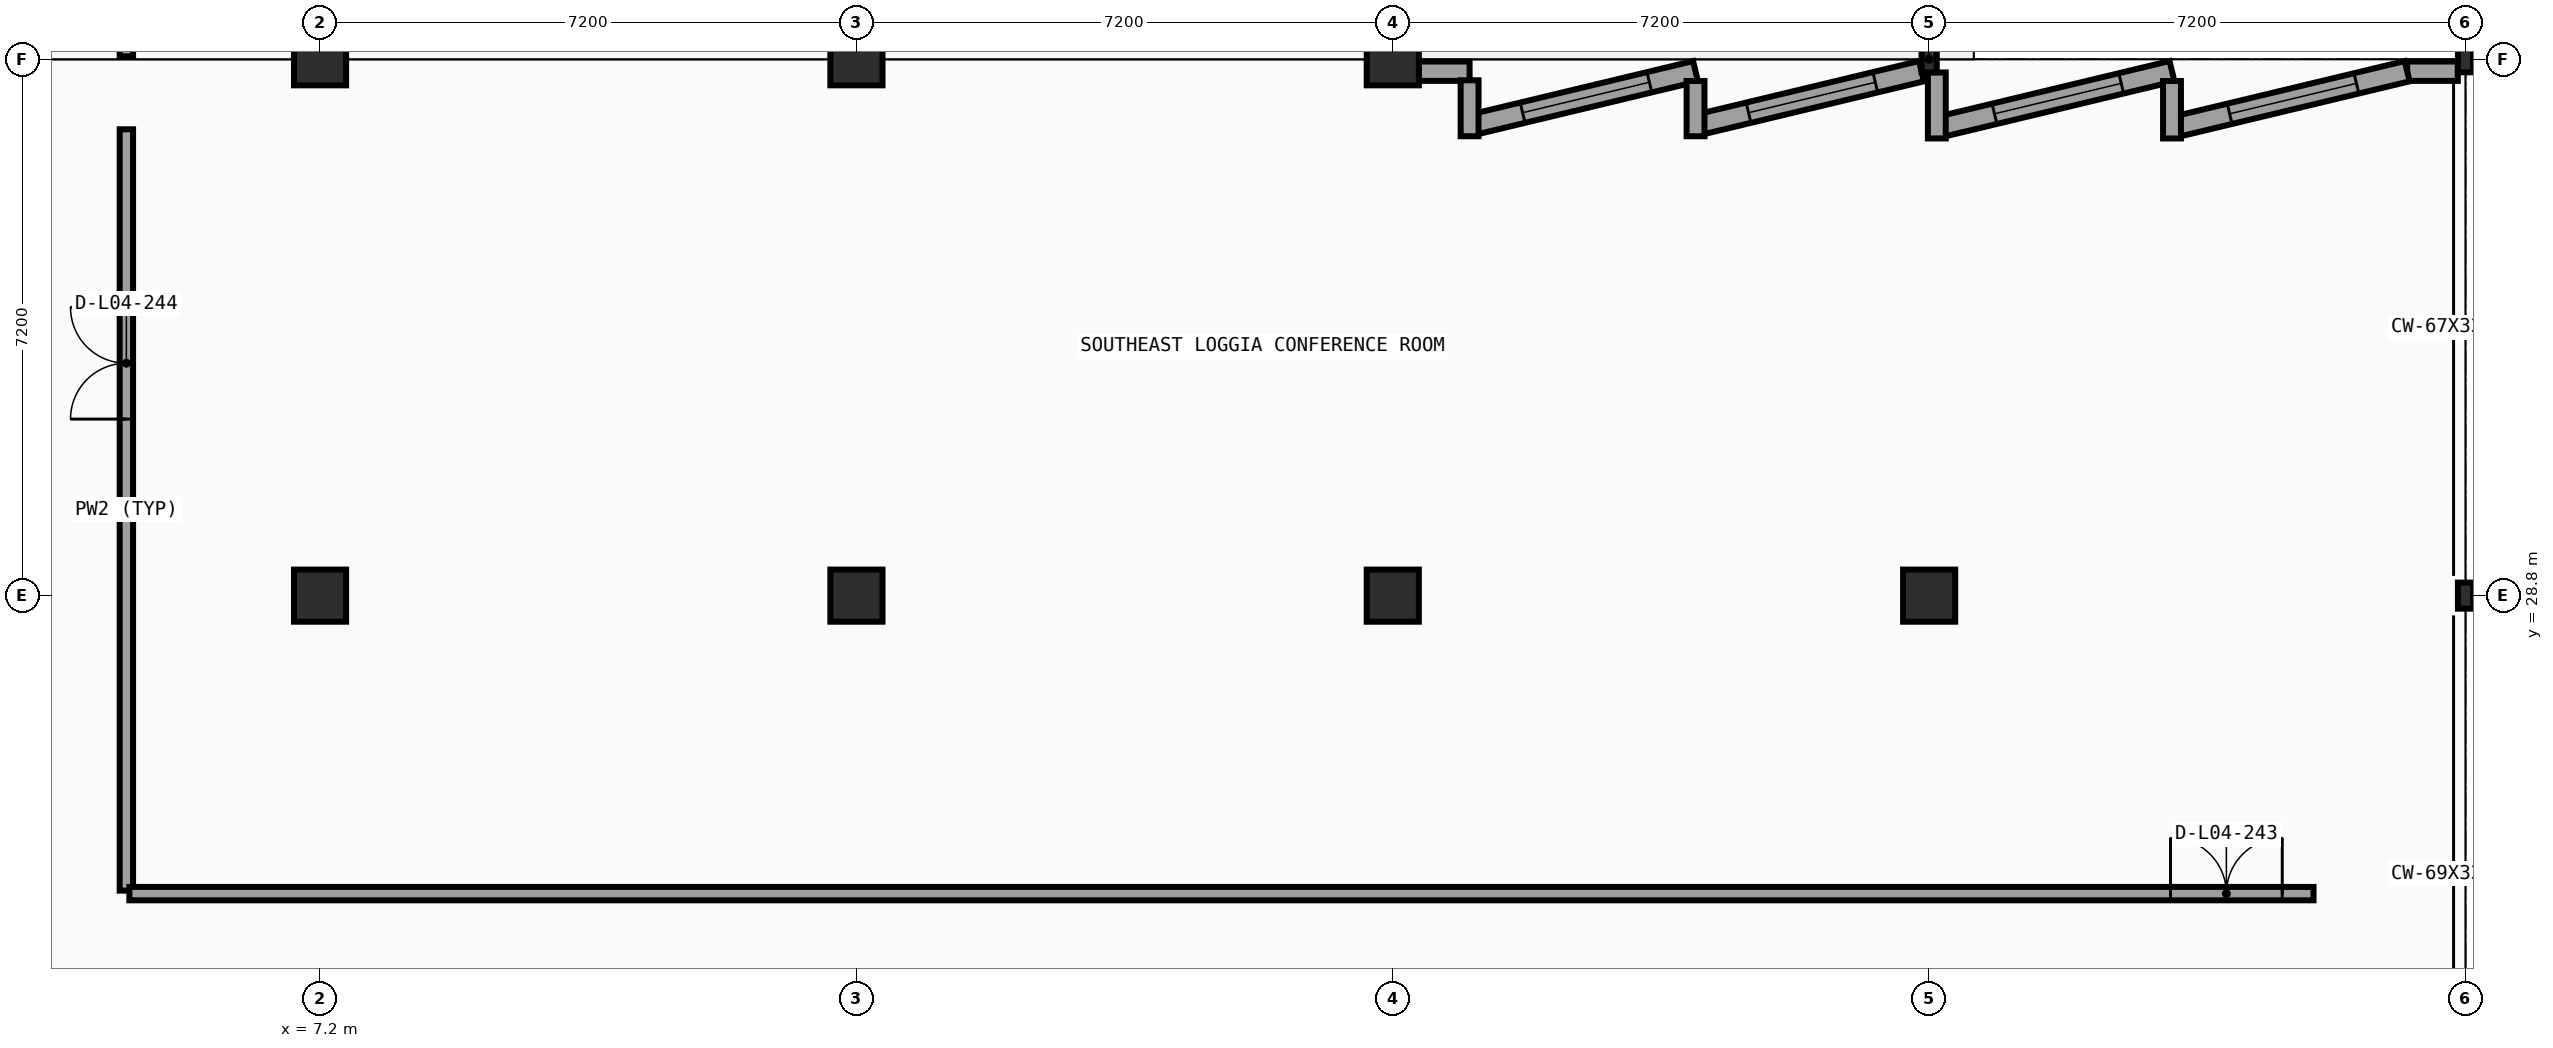
"""IFC4 building model, lengths in metres.
Left out: names, types, materials, properties, quantities, classifications, styles, units other than length and angle.
Written with IfcOpenShell. Run it as: python <this file> out.ifc"""

import sys

from ifc_helpers import new_model, si_unit, direction, frame, frame_2d, origin, origin_2d, place, context, subcontext, project, spatial, rectangle, i_section, extrude, element, fill, save


model = new_model("IFC4")
c1 = context("Model", 3, precision=1e-05, world=origin(), true_north=direction((0.0, 1.0)))
c2 = subcontext(c1, "Body", "Model", "MODEL_VIEW")
j1 = project(units=[si_unit("LENGTHUNIT", "METRE"), si_unit("PLANEANGLEUNIT", "RADIAN")], contexts=[c1])
p1 = place(None, origin())
s1 = spatial("IfcSite", under=j1, at=p1, CompositionType="ELEMENT")
p2 = place(p1, origin())
s2 = spatial("IfcBuilding", under=s1, at=p2, CompositionType="ELEMENT")
p3 = place(p2, frame((0.0, 0.0, 18.9)))
s3 = spatial("IfcBuildingStorey", under=s2, at=p3, CompositionType="ELEMENT", Elevation=18.9)
for number, where, z_axis, x_axis in (
    (1, (7.2, 28.8, 0.0), (0.0, 0.0, 1.0), (1.0, 0.0, 0.0)),
    (2, (7.2, 36.0, 0.0), (0.0, 0.0, 1.0), (1.0, 0.0, 0.0)),
    (3, (14.4, 28.8, 0.0), (0.0, 0.0, 1.0), (1.0, 0.0, 0.0)),
    (4, (14.4, 36.0, 0.0), (0.0, 0.0, 1.0), (1.0, 0.0, 0.0)),
    (5, (21.6, 28.8, 0.0), (0.0, 0.0, 1.0), (1.0, 0.0, 0.0)),
    (6, (21.6, 36.0, 0.0), (0.0, 0.0, 1.0), (1.0, 0.0, 0.0)),
    (7, (28.8, 28.8, 0.0), (0.0, 0.0, 1.0), (1.0, 0.0, 0.0)),
):
    element("IfcColumn", number, at=place(p3, frame(where, z_axis=z_axis, x_axis=x_axis)), inside=s3, PredefinedType="COLUMN", context=c2, shape_type="SweptSolid", body=[
        extrude(rectangle(XDim=0.7, YDim=0.7, at=origin_2d()), origin(), (0.0, 0.0, 1.0), 4.05),
    ])
for number, where, z_axis, x_axis in (
    (8, (28.8, 36.0, 0.0), (0.0, 0.0, 1.0), (1.0, 0.0, 0.0)),
    (9, (36.0, 28.8, 0.0), (0.0, 0.0, 1.0), (1.0, 0.0, 0.0)),
    (10, (36.0, 36.0, 0.0), (0.0, 0.0, 1.0), (1.0, 0.0, 0.0)),
):
    element("IfcColumn", number, at=place(p3, frame(where, z_axis=z_axis, x_axis=x_axis)), inside=s3, PredefinedType="COLUMN", context=c2, shape_type="SweptSolid", body=[
        extrude(i_section(OverallWidth=0.204, OverallDepth=0.35, WebThickness=0.009, FlangeThickness=0.015, FilletRadius=0.015, at=origin_2d()), origin(), (0.0, 0.0, 1.0), 4.05),
    ])
p4 = place(p3, frame((21.951, 35.84, 0.0), z_axis=(0.0, 0.0, 1.0), x_axis=(1.0, 0.0, 0.0)))
e11 = element("IfcWall", 11, at=p4, inside=s3, PredefinedType="SOLIDWALL", context=c2, shape_type="SweptSolid", body=[
    extrude(rectangle(XDim=0.68, YDim=0.26, at=frame_2d((0.34, 0.0))), origin(), (0.0, 0.0, 1.0), 3.216),
])
p5 = place(p3, frame((22.723, 35.134, 0.0), z_axis=(0.0, 0.0, 1.0), x_axis=(0.972365314325, 0.233464548695, 0.0)))
e12 = element("IfcWall", 12, at=p5, inside=s3, PredefinedType="SOLIDWALL", context=c2, shape_type="SweptSolid", body=[
    extrude(rectangle(XDim=3.024, YDim=0.28, at=frame_2d((1.512, 0.0))), origin(), (0.0, 0.0, 1.0), 3.216),
])
p6 = place(p5, frame((0.637, 0.0, 0.8)))
e13 = element("IfcOpeningElement", 13, at=p6, cuts=e12, PredefinedType="OPENING", context=c2, shape_type="SweptSolid", body=[
    extrude(rectangle(XDim=1.75, YDim=2.05, at=frame_2d((0.875, 1.025))), frame((0.0, 0.15, 0.0), z_axis=(0.0, -1.0, 0.0), x_axis=(1.0, 0.0, 0.0)), (0.0, 0.0, 1.0), 0.3),
])
p7 = place(p3, frame((22.631, 34.967, 0.0), z_axis=(0.0, 0.0, 1.0), x_axis=(0.0, 1.0, 0.0)))
e14 = element("IfcWall", 14, at=p7, inside=s3, PredefinedType="SOLIDWALL", context=c2, shape_type="SweptSolid", body=[
    extrude(rectangle(XDim=0.751, YDim=0.24, at=frame_2d((0.375, 0.0))), origin(), (0.0, 0.0, 1.0), 3.8),
])
p8 = place(p3, frame((25.756, 35.134, 0.0), z_axis=(0.0, 0.0, 1.0), x_axis=(0.972365314325, 0.233464548695, 0.0)))
e15 = element("IfcWall", 15, at=p8, inside=s3, PredefinedType="SOLIDWALL", context=c2, shape_type="SweptSolid", body=[
    extrude(rectangle(XDim=3.024, YDim=0.28, at=frame_2d((1.512, 0.0))), origin(), (0.0, 0.0, 1.0), 3.216),
])
p9 = place(p8, frame((0.637, 0.0, 0.8)))
e16 = element("IfcOpeningElement", 16, at=p9, cuts=e15, PredefinedType="OPENING", context=c2, shape_type="SweptSolid", body=[
    extrude(rectangle(XDim=1.75, YDim=2.05, at=frame_2d((0.875, 1.025))), frame((0.0, 0.15, 0.0), z_axis=(0.0, -1.0, 0.0), x_axis=(1.0, 0.0, 0.0)), (0.0, 0.0, 1.0), 0.3),
])
p10 = place(p3, frame((25.664, 34.967, 0.0), z_axis=(0.0, 0.0, 1.0), x_axis=(0.0, 1.0, 0.0)))
e17 = element("IfcWall", 17, at=p10, inside=s3, PredefinedType="SOLIDWALL", context=c2, shape_type="SweptSolid", body=[
    extrude(rectangle(XDim=0.741, YDim=0.24, at=frame_2d((0.371, 0.0))), origin(), (0.0, 0.0, 1.0), 3.8),
])
p11 = place(p3, frame((35.217, 35.84, 0.0), z_axis=(0.0, 0.0, 1.0), x_axis=(1.0, 0.0, 0.0)))
e18 = element("IfcWall", 18, at=p11, inside=s3, PredefinedType="SOLIDWALL", context=c2, shape_type="SweptSolid", body=[
    extrude(rectangle(XDim=0.68, YDim=0.26, at=frame_2d((0.34, 0.0))), origin(), (0.0, 0.0, 1.0), 3.216),
])
p12 = place(p3, frame((28.995, 35.104, 0.0), z_axis=(0.0, 0.0, 1.0), x_axis=(0.972364797516, 0.233466701164, 0.0)))
e19 = element("IfcWall", 19, at=p12, inside=s3, PredefinedType="SOLIDWALL", context=c2, shape_type="SweptSolid", body=[
    extrude(rectangle(XDim=3.152, YDim=0.28, at=frame_2d((1.576, 0.0))), origin(), (0.0, 0.0, 1.0), 3.206),
])
p13 = place(p12, frame((0.701, 0.0, 0.8)))
e20 = element("IfcOpeningElement", 20, at=p13, cuts=e19, PredefinedType="OPENING", context=c2, shape_type="SweptSolid", body=[
    extrude(rectangle(XDim=1.75, YDim=2.05, at=frame_2d((0.875, 1.025))), frame((0.0, 0.15, 0.0), z_axis=(0.0, -1.0, 0.0), x_axis=(1.0, 0.0, 0.0)), (0.0, 0.0, 1.0), 0.3),
])
p14 = place(p3, frame((28.903, 34.937, 0.0), z_axis=(0.0, 0.0, 1.0), x_axis=(0.0, 1.0, 0.0)))
e21 = element("IfcWall", 21, at=p14, inside=s3, PredefinedType="SOLIDWALL", context=c2, shape_type="SweptSolid", body=[
    extrude(rectangle(XDim=0.886, YDim=0.24, at=frame_2d((0.443, 0.0))), origin(), (0.0, 0.0, 1.0), 3.206),
])
p15 = place(p3, frame((32.152, 35.104, 0.0), z_axis=(0.0, 0.0, 1.0), x_axis=(0.972364797516, 0.233466701164, 0.0)))
e22 = element("IfcWall", 22, at=p15, inside=s3, PredefinedType="SOLIDWALL", context=c2, shape_type="SweptSolid", body=[
    extrude(rectangle(XDim=3.152, YDim=0.28, at=frame_2d((1.576, 0.0))), origin(), (0.0, 0.0, 1.0), 3.216),
])
p16 = place(p15, frame((0.701, 0.0, 0.8)))
e23 = element("IfcOpeningElement", 23, at=p16, cuts=e22, PredefinedType="OPENING", context=c2, shape_type="SweptSolid", body=[
    extrude(rectangle(XDim=1.75, YDim=2.05, at=frame_2d((0.875, 1.025))), frame((0.0, 0.15, 0.0), z_axis=(0.0, -1.0, 0.0), x_axis=(1.0, 0.0, 0.0)), (0.0, 0.0, 1.0), 0.3),
])
p17 = place(p3, frame((32.06, 34.937, 0.0), z_axis=(0.0, 0.0, 1.0), x_axis=(0.0, 1.0, 0.0)))
e24 = element("IfcWall", 24, at=p17, inside=s3, PredefinedType="SOLIDWALL", context=c2, shape_type="SweptSolid", body=[
    extrude(rectangle(XDim=0.771, YDim=0.24, at=frame_2d((0.385, 0.0))), origin(), (0.0, 0.0, 1.0), 3.8),
])
p18 = place(p3, frame((4.6, 24.84, 0.0), z_axis=(0.0, 0.0, 1.0), x_axis=(0.0, 1.0, 0.0)))
e25 = element("IfcWall", 25, at=p18, inside=s3, PredefinedType="PARTITIONING", context=c2, shape_type="SweptSolid", body=[
    extrude(rectangle(XDim=10.22, YDim=0.18, at=frame_2d((5.11, 0.0))), origin(), (0.0, 0.0, 1.0), 3.208),
])
p19 = place(p18, frame((6.33, 0.0, 0.0)))
e26 = element("IfcOpeningElement", 26, at=p19, cuts=e25, PredefinedType="OPENING", context=c2, shape_type="SweptSolid", body=[
    extrude(rectangle(XDim=1.5, YDim=2.1, at=frame_2d((0.75, 1.05))), frame((0.0, 0.1, 0.0), z_axis=(0.0, -1.0, 0.0), x_axis=(1.0, 0.0, 0.0)), (0.0, 0.0, 1.0), 0.2),
])
p20 = place(p3, frame((4.6, 36.04, 0.0), z_axis=(0.0, 0.0, 1.0), x_axis=(0.0, 1.0, 0.0)))
e27 = element("IfcWall", 27, at=p20, inside=s3, PredefinedType="PARTITIONING", context=c2, shape_type="SweptSolid", body=[
    extrude(rectangle(XDim=14.32, YDim=0.18, at=frame_2d((7.16, 0.0))), origin(), (0.0, 0.0, 1.0), 3.208),
])
p21 = place(p20, frame((3.54, 0.0, 0.0)))
e28 = element("IfcOpeningElement", 28, at=p21, cuts=e27, PredefinedType="OPENING", context=c2, shape_type="SweptSolid", body=[
    extrude(rectangle(XDim=1.0, YDim=2.1, at=frame_2d((0.5, 1.05))), frame((0.0, 0.1, 0.0), z_axis=(0.0, -1.0, 0.0), x_axis=(1.0, 0.0, 0.0)), (0.0, 0.0, 1.0), 0.2),
])
p22 = place(p3, frame((4.64, 24.8, 0.0), z_axis=(0.0, 0.0, 1.0), x_axis=(1.0, 0.0, 0.0)))
e29 = element("IfcWall", 29, at=p22, inside=s3, PredefinedType="PARTITIONING", context=c2, shape_type="SweptSolid", body=[
    extrude(rectangle(XDim=29.32, YDim=0.18, at=frame_2d((14.66, 0.0))), origin(), (0.0, 0.0, 1.0), 3.206),
])
p23 = place(p22, frame((27.4, 0.0, 0.0)))
e30 = element("IfcOpeningElement", 30, at=p23, cuts=e29, PredefinedType="OPENING", context=c2, shape_type="SweptSolid", body=[
    extrude(rectangle(XDim=1.5, YDim=2.1, at=frame_2d((0.75, 1.05))), frame((0.0, 0.1, 0.0), z_axis=(0.0, -1.0, 0.0), x_axis=(1.0, 0.0, 0.0)), (0.0, 0.0, 1.0), 0.2),
])
p24 = place(p6, origin())
e31 = element("IfcWindow", 31, at=p24, inside=s3, PartitioningType="SINGLE_PANEL", PredefinedType="WINDOW", context=c2, shape_type="SweptSolid", body=[
    extrude(rectangle(XDim=1.75, YDim=2.05, at=frame_2d((0.875, 1.025))), frame((0.0, 0.03, 0.0), z_axis=(0.0, -1.0, 0.0), x_axis=(1.0, 0.0, 0.0)), (0.0, 0.0, 1.0), 0.06),
])
fill(e13, e31)
p25 = place(p9, origin())
e32 = element("IfcWindow", 32, at=p25, inside=s3, PartitioningType="SINGLE_PANEL", PredefinedType="WINDOW", context=c2, shape_type="SweptSolid", body=[
    extrude(rectangle(XDim=1.75, YDim=2.05, at=frame_2d((0.875, 1.025))), frame((0.0, 0.03, 0.0), z_axis=(0.0, -1.0, 0.0), x_axis=(1.0, 0.0, 0.0)), (0.0, 0.0, 1.0), 0.06),
])
fill(e16, e32)
p26 = place(p13, origin())
e33 = element("IfcWindow", 33, at=p26, inside=s3, PartitioningType="SINGLE_PANEL", PredefinedType="WINDOW", context=c2, shape_type="SweptSolid", body=[
    extrude(rectangle(XDim=1.75, YDim=2.05, at=frame_2d((0.875, 1.025))), frame((0.0, 0.03, 0.0), z_axis=(0.0, -1.0, 0.0), x_axis=(1.0, 0.0, 0.0)), (0.0, 0.0, 1.0), 0.06),
])
fill(e20, e33)
p27 = place(p16, origin())
e34 = element("IfcWindow", 34, at=p27, inside=s3, PartitioningType="SINGLE_PANEL", PredefinedType="WINDOW", context=c2, shape_type="SweptSolid", body=[
    extrude(rectangle(XDim=1.75, YDim=2.05, at=frame_2d((0.875, 1.025))), frame((0.0, 0.03, 0.0), z_axis=(0.0, -1.0, 0.0), x_axis=(1.0, 0.0, 0.0)), (0.0, 0.0, 1.0), 0.06),
])
fill(e23, e34)
p28 = place(p23, origin())
e35 = element("IfcDoor", 35, at=p28, inside=s3, OperationType="DOUBLE_DOOR_SINGLE_SWING", PredefinedType="DOOR", context=c2, shape_type="SweptSolid", body=[
    extrude(rectangle(XDim=1.5, YDim=2.1, at=frame_2d((0.75, 1.05))), frame((0.0, 0.025, 0.0), z_axis=(0.0, -1.0, 0.0), x_axis=(1.0, 0.0, 0.0)), (0.0, 0.0, 1.0), 0.05),
])
fill(e30, e35)
p29 = place(p19, origin())
e36 = element("IfcDoor", 36, at=p29, inside=s3, OperationType="DOUBLE_DOOR_SINGLE_SWING", PredefinedType="DOOR", context=c2, shape_type="SweptSolid", body=[
    extrude(rectangle(XDim=1.5, YDim=2.1, at=frame_2d((0.75, 1.05))), frame((0.0, 0.025, 0.0), z_axis=(0.0, -1.0, 0.0), x_axis=(1.0, 0.0, 0.0)), (0.0, 0.0, 1.0), 0.05),
])
fill(e26, e36)
save(model, sys.argv[1])
